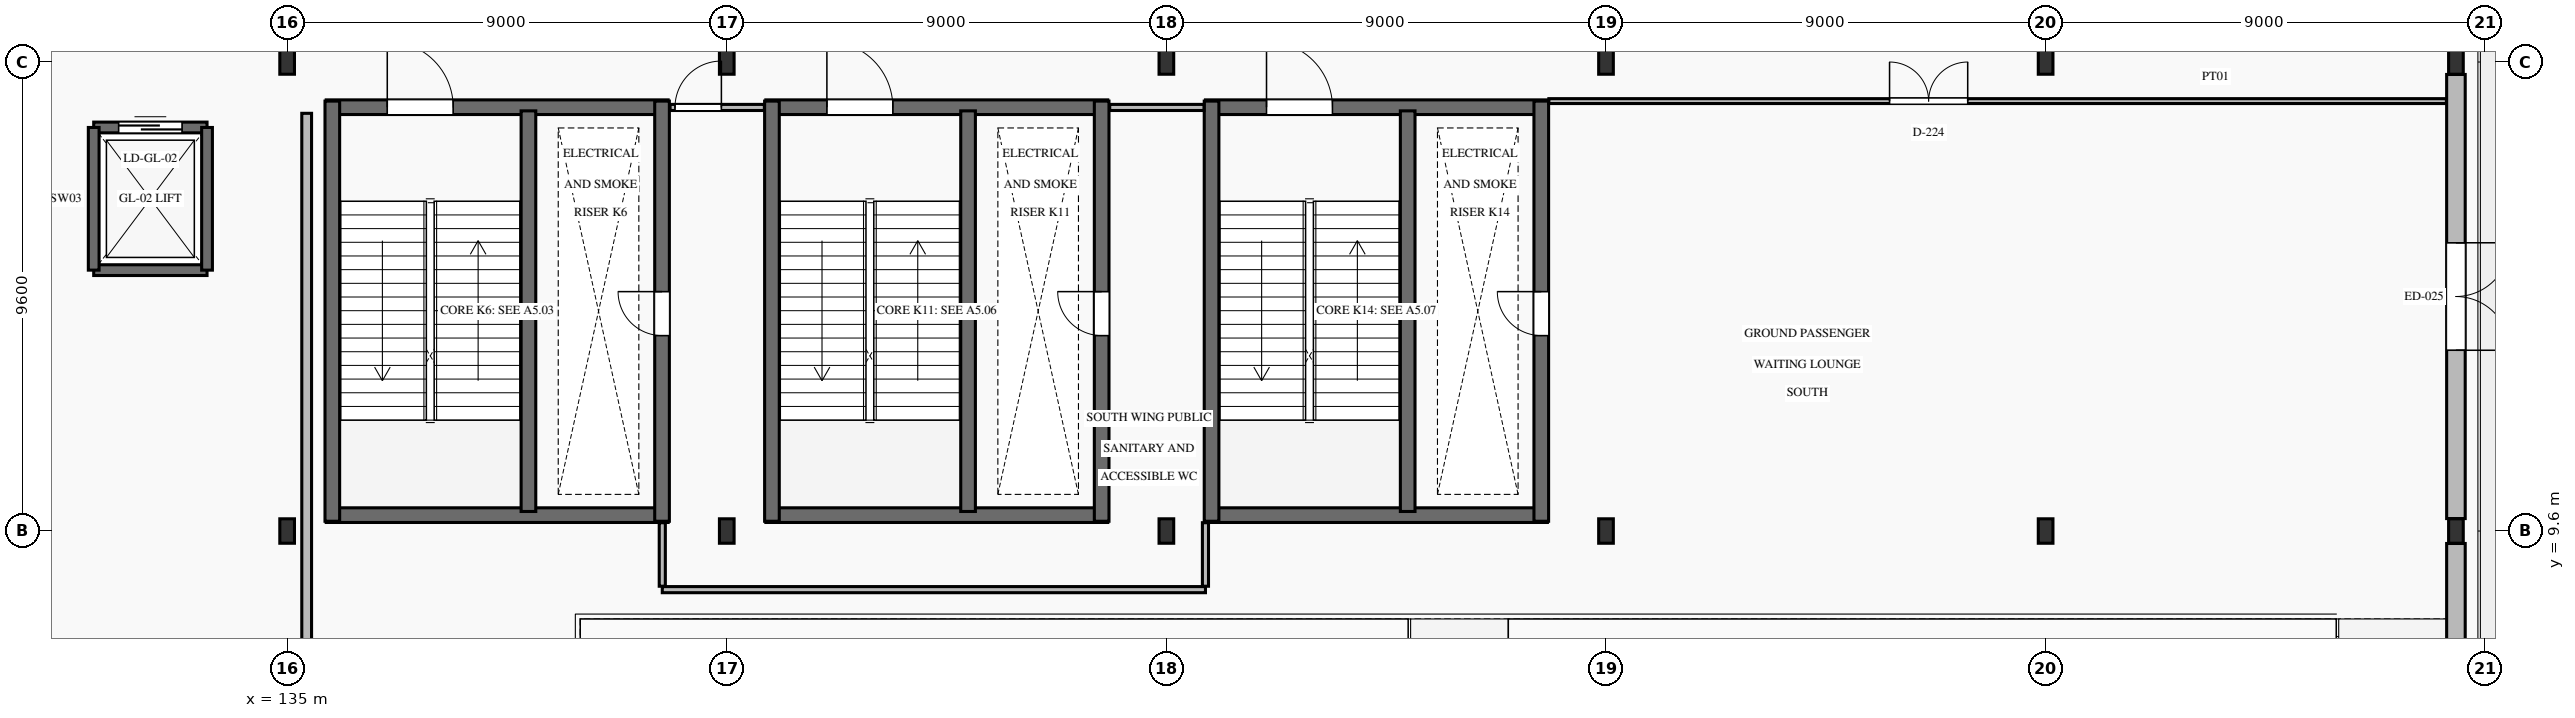
"""IFC4 building model, lengths in metres.
Left out: names, types, materials, properties, quantities, classifications, styles, units other than length and angle.
Written with IfcOpenShell. Run it as: python <this file> out.ifc"""

import sys

from ifc_helpers import new_model, si_unit, direction, frame, frame_2d, origin, origin_2d, place, context, subcontext, project, spatial, rectangle, i_section, extrude, element, fill, save


model = new_model("IFC4")
c1 = context("Model", 3, precision=1e-05, world=origin(), true_north=direction((0.0, 1.0)))
c2 = subcontext(c1, "Body", "Model", "MODEL_VIEW")
j1 = project(units=[si_unit("LENGTHUNIT", "METRE"), si_unit("PLANEANGLEUNIT", "RADIAN")], contexts=[c1])
p1 = place(None, origin())
s1 = spatial("IfcSite", under=j1, at=p1, CompositionType="ELEMENT")
p2 = place(p1, origin())
s2 = spatial("IfcBuilding", under=s1, at=p2, CompositionType="ELEMENT")
p3 = place(p2, origin())
s3 = spatial("IfcBuildingStorey", under=s2, at=p3, CompositionType="ELEMENT", Elevation=0.0)
for number, where, z_axis, x_axis in (
    (1, (135.0, 9.6, 0.0), (0.0, 0.0, 1.0), (1.0, 0.0, 0.0)),
    (2, (135.0, 19.2, 0.0), (0.0, 0.0, 1.0), (1.0, 0.0, 0.0)),
    (3, (144.0, 9.6, 0.0), (0.0, 0.0, 1.0), (1.0, 0.0, 0.0)),
    (4, (144.0, 19.2, 0.0), (0.0, 0.0, 1.0), (1.0, 0.0, 0.0)),
    (5, (153.0, 9.6, 0.0), (0.0, 0.0, 1.0), (1.0, 0.0, 0.0)),
    (6, (153.0, 19.2, 0.0), (0.0, 0.0, 1.0), (1.0, 0.0, 0.0)),
    (7, (162.0, 9.6, 0.0), (0.0, 0.0, 1.0), (1.0, 0.0, 0.0)),
    (8, (162.0, 19.2, 0.0), (0.0, 0.0, 1.0), (1.0, 0.0, 0.0)),
    (9, (171.0, 9.6, 0.0), (0.0, 0.0, 1.0), (1.0, 0.0, 0.0)),
    (10, (171.0, 19.2, 0.0), (0.0, 0.0, 1.0), (1.0, 0.0, 0.0)),
    (11, (179.4, 9.6, 0.0), (0.0, 0.0, 1.0), (1.0, 0.0, 0.0)),
    (12, (179.4, 19.2, 0.0), (0.0, 0.0, 1.0), (1.0, 0.0, 0.0)),
):
    element("IfcColumn", number, at=place(p3, frame(where, z_axis=z_axis, x_axis=x_axis)), inside=s3, PredefinedType="COLUMN", context=c2, shape_type="SweptSolid", body=[
        extrude(i_section(OverallWidth=0.3, OverallDepth=0.5, WebThickness=0.014, FlangeThickness=0.028, FilletRadius=0.027, at=origin_2d()), origin(), (0.0, 0.0, 1.0), 6.0),
    ])
p4 = place(p3, frame((179.4, 0.255, 0.0), z_axis=(0.0, 0.0, 1.0), x_axis=(0.0, 1.0, 0.0)))
e13 = element("IfcWall", 13, at=p4, inside=s3, PredefinedType="SOLIDWALL", context=c2, shape_type="SweptSolid", body=[
    extrude(rectangle(XDim=9.09, YDim=0.38, at=frame_2d((4.545, 0.0))), origin(), (0.0, 0.0, 1.0), 5.48),
])
p5 = place(p4, frame((2.245, 0.0, 0.0)))
e14 = element("IfcOpeningElement", 14, at=p5, cuts=e13, PredefinedType="OPENING", context=c2, shape_type="SweptSolid", body=[
    extrude(rectangle(XDim=4.6, YDim=3.4, at=frame_2d((2.3, 1.7))), frame((0.0, 0.205, 0.0), z_axis=(0.0, -1.0, 0.0), x_axis=(1.0, 0.0, 0.0)), (0.0, 0.0, 1.0), 0.41),
])
p6 = place(p3, frame((179.4, 9.855, 0.0), z_axis=(0.0, 0.0, 1.0), x_axis=(0.0, 1.0, 0.0)))
e15 = element("IfcWall", 15, at=p6, inside=s3, PredefinedType="SOLIDWALL", context=c2, shape_type="SweptSolid", body=[
    extrude(rectangle(XDim=9.09, YDim=0.38, at=frame_2d((4.545, 0.0))), origin(), (0.0, 0.0, 1.0), 5.48),
])
p7 = place(p6, frame((3.445, 0.0, 0.0)))
e16 = element("IfcOpeningElement", 16, at=p7, cuts=e15, PredefinedType="OPENING", context=c2, shape_type="SweptSolid", body=[
    extrude(rectangle(XDim=2.2, YDim=2.4, at=frame_2d((1.1, 1.2))), frame((0.0, 0.205, 0.0), z_axis=(0.0, -1.0, 0.0), x_axis=(1.0, 0.0, 0.0)), (0.0, 0.0, 1.0), 0.41),
])
p8 = place(p3, frame((135.8, 9.925, 0.0), z_axis=(0.0, 0.0, 1.0), x_axis=(1.0, 0.0, 0.0)))
e17 = element("IfcWall", 17, at=p8, inside=s3, PredefinedType="SHEAR", context=c2, shape_type="SweptSolid", body=[
    extrude(rectangle(XDim=7.0, YDim=0.3, at=frame_2d((3.5, 0.0))), origin(), (0.0, 0.0, 1.0), 6.0),
])
p9 = place(p3, frame((135.8, 18.275, 0.0), z_axis=(0.0, 0.0, 1.0), x_axis=(1.0, 0.0, 0.0)))
e18 = element("IfcWall", 18, at=p9, inside=s3, PredefinedType="SHEAR", context=c2, shape_type="SweptSolid", body=[
    extrude(rectangle(XDim=7.0, YDim=0.3, at=frame_2d((3.5, 0.0))), origin(), (0.0, 0.0, 1.0), 6.0),
])
p10 = place(p9, frame((1.25, 0.0, 0.0)))
e19 = element("IfcOpeningElement", 19, at=p10, cuts=e18, PredefinedType="OPENING", context=c2, shape_type="SweptSolid", body=[
    extrude(rectangle(XDim=1.35, YDim=2.2, at=frame_2d((0.675, 1.1))), frame((0.0, 0.165, 0.0), z_axis=(0.0, -1.0, 0.0), x_axis=(1.0, 0.0, 0.0)), (0.0, 0.0, 1.0), 0.33),
])
p11 = place(p3, frame((135.925, 9.8, 0.0), z_axis=(0.0, 0.0, 1.0), x_axis=(0.0, 1.0, 0.0)))
e20 = element("IfcWall", 20, at=p11, inside=s3, PredefinedType="SHEAR", context=c2, shape_type="SweptSolid", body=[
    extrude(rectangle(XDim=8.6, YDim=0.3, at=frame_2d((4.3, 0.0))), origin(), (0.0, 0.0, 1.0), 6.0),
])
p12 = place(p3, frame((142.675, 9.8, 0.0), z_axis=(0.0, 0.0, 1.0), x_axis=(0.0, 1.0, 0.0)))
e21 = element("IfcWall", 21, at=p12, inside=s3, PredefinedType="SHEAR", context=c2, shape_type="SweptSolid", body=[
    extrude(rectangle(XDim=8.6, YDim=0.3, at=frame_2d((4.3, 0.0))), origin(), (0.0, 0.0, 1.0), 6.0),
])
p13 = place(p12, frame((3.8, 0.0, 0.0)))
e22 = element("IfcOpeningElement", 22, at=p13, cuts=e21, PredefinedType="OPENING", context=c2, shape_type="SweptSolid", body=[
    extrude(rectangle(XDim=0.9, YDim=2.05, at=frame_2d((0.45, 1.025))), frame((0.0, 0.165, 0.0), z_axis=(0.0, -1.0, 0.0), x_axis=(1.0, 0.0, 0.0)), (0.0, 0.0, 1.0), 0.33),
])
p14 = place(p3, frame((139.94, 10.0, 0.0), z_axis=(0.0, 0.0, 1.0), x_axis=(0.0, 1.0, 0.0)))
e23 = element("IfcWall", 23, at=p14, inside=s3, PredefinedType="SHEAR", context=c2, shape_type="SweptSolid", body=[
    extrude(rectangle(XDim=8.2, YDim=0.3, at=frame_2d((4.1, 0.0))), origin(), (0.0, 0.0, 1.0), 6.0),
])
p15 = place(p3, frame((144.8, 9.925, 0.0), z_axis=(0.0, 0.0, 1.0), x_axis=(1.0, 0.0, 0.0)))
e24 = element("IfcWall", 24, at=p15, inside=s3, PredefinedType="SHEAR", context=c2, shape_type="SweptSolid", body=[
    extrude(rectangle(XDim=7.0, YDim=0.3, at=frame_2d((3.5, 0.0))), origin(), (0.0, 0.0, 1.0), 6.0),
])
p16 = place(p3, frame((144.8, 18.275, 0.0), z_axis=(0.0, 0.0, 1.0), x_axis=(1.0, 0.0, 0.0)))
e25 = element("IfcWall", 25, at=p16, inside=s3, PredefinedType="SHEAR", context=c2, shape_type="SweptSolid", body=[
    extrude(rectangle(XDim=7.0, YDim=0.3, at=frame_2d((3.5, 0.0))), origin(), (0.0, 0.0, 1.0), 6.0),
])
p17 = place(p16, frame((1.25, 0.0, 0.0)))
e26 = element("IfcOpeningElement", 26, at=p17, cuts=e25, PredefinedType="OPENING", context=c2, shape_type="SweptSolid", body=[
    extrude(rectangle(XDim=1.35, YDim=2.2, at=frame_2d((0.675, 1.1))), frame((0.0, 0.165, 0.0), z_axis=(0.0, -1.0, 0.0), x_axis=(1.0, 0.0, 0.0)), (0.0, 0.0, 1.0), 0.33),
])
p18 = place(p3, frame((144.925, 9.8, 0.0), z_axis=(0.0, 0.0, 1.0), x_axis=(0.0, 1.0, 0.0)))
e27 = element("IfcWall", 27, at=p18, inside=s3, PredefinedType="SHEAR", context=c2, shape_type="SweptSolid", body=[
    extrude(rectangle(XDim=8.6, YDim=0.3, at=frame_2d((4.3, 0.0))), origin(), (0.0, 0.0, 1.0), 6.0),
])
p19 = place(p3, frame((151.675, 9.8, 0.0), z_axis=(0.0, 0.0, 1.0), x_axis=(0.0, 1.0, 0.0)))
e28 = element("IfcWall", 28, at=p19, inside=s3, PredefinedType="SHEAR", context=c2, shape_type="SweptSolid", body=[
    extrude(rectangle(XDim=8.6, YDim=0.3, at=frame_2d((4.3, 0.0))), origin(), (0.0, 0.0, 1.0), 6.0),
])
p20 = place(p19, frame((3.8, 0.0, 0.0)))
e29 = element("IfcOpeningElement", 29, at=p20, cuts=e28, PredefinedType="OPENING", context=c2, shape_type="SweptSolid", body=[
    extrude(rectangle(XDim=0.9, YDim=2.05, at=frame_2d((0.45, 1.025))), frame((0.0, 0.165, 0.0), z_axis=(0.0, -1.0, 0.0), x_axis=(1.0, 0.0, 0.0)), (0.0, 0.0, 1.0), 0.33),
])
p21 = place(p3, frame((148.94, 10.0, 0.0), z_axis=(0.0, 0.0, 1.0), x_axis=(0.0, 1.0, 0.0)))
e30 = element("IfcWall", 30, at=p21, inside=s3, PredefinedType="SHEAR", context=c2, shape_type="SweptSolid", body=[
    extrude(rectangle(XDim=8.2, YDim=0.3, at=frame_2d((4.1, 0.0))), origin(), (0.0, 0.0, 1.0), 6.0),
])
p22 = place(p3, frame((153.8, 9.925, 0.0), z_axis=(0.0, 0.0, 1.0), x_axis=(1.0, 0.0, 0.0)))
e31 = element("IfcWall", 31, at=p22, inside=s3, PredefinedType="SHEAR", context=c2, shape_type="SweptSolid", body=[
    extrude(rectangle(XDim=7.0, YDim=0.3, at=frame_2d((3.5, 0.0))), origin(), (0.0, 0.0, 1.0), 6.0),
])
p23 = place(p3, frame((153.8, 18.275, 0.0), z_axis=(0.0, 0.0, 1.0), x_axis=(1.0, 0.0, 0.0)))
e32 = element("IfcWall", 32, at=p23, inside=s3, PredefinedType="SHEAR", context=c2, shape_type="SweptSolid", body=[
    extrude(rectangle(XDim=7.0, YDim=0.3, at=frame_2d((3.5, 0.0))), origin(), (0.0, 0.0, 1.0), 6.0),
])
p24 = place(p23, frame((1.25, 0.0, 0.0)))
e33 = element("IfcOpeningElement", 33, at=p24, cuts=e32, PredefinedType="OPENING", context=c2, shape_type="SweptSolid", body=[
    extrude(rectangle(XDim=1.35, YDim=2.2, at=frame_2d((0.675, 1.1))), frame((0.0, 0.165, 0.0), z_axis=(0.0, -1.0, 0.0), x_axis=(1.0, 0.0, 0.0)), (0.0, 0.0, 1.0), 0.33),
])
p25 = place(p3, frame((153.925, 9.8, 0.0), z_axis=(0.0, 0.0, 1.0), x_axis=(0.0, 1.0, 0.0)))
e34 = element("IfcWall", 34, at=p25, inside=s3, PredefinedType="SHEAR", context=c2, shape_type="SweptSolid", body=[
    extrude(rectangle(XDim=8.6, YDim=0.3, at=frame_2d((4.3, 0.0))), origin(), (0.0, 0.0, 1.0), 6.0),
])
p26 = place(p3, frame((160.675, 9.8, 0.0), z_axis=(0.0, 0.0, 1.0), x_axis=(0.0, 1.0, 0.0)))
e35 = element("IfcWall", 35, at=p26, inside=s3, PredefinedType="SHEAR", context=c2, shape_type="SweptSolid", body=[
    extrude(rectangle(XDim=8.6, YDim=0.3, at=frame_2d((4.3, 0.0))), origin(), (0.0, 0.0, 1.0), 6.0),
])
p27 = place(p26, frame((3.8, 0.0, 0.0)))
e36 = element("IfcOpeningElement", 36, at=p27, cuts=e35, PredefinedType="OPENING", context=c2, shape_type="SweptSolid", body=[
    extrude(rectangle(XDim=0.9, YDim=2.05, at=frame_2d((0.45, 1.025))), frame((0.0, 0.165, 0.0), z_axis=(0.0, -1.0, 0.0), x_axis=(1.0, 0.0, 0.0)), (0.0, 0.0, 1.0), 0.33),
])
p28 = place(p3, frame((157.94, 10.0, 0.0), z_axis=(0.0, 0.0, 1.0), x_axis=(0.0, 1.0, 0.0)))
e37 = element("IfcWall", 37, at=p28, inside=s3, PredefinedType="SHEAR", context=c2, shape_type="SweptSolid", body=[
    extrude(rectangle(XDim=8.2, YDim=0.3, at=frame_2d((4.1, 0.0))), origin(), (0.0, 0.0, 1.0), 6.0),
])
p29 = place(p3, frame((131.04, 14.94, 0.0), z_axis=(0.0, 0.0, 1.0), x_axis=(1.0, 0.0, 0.0)))
e38 = element("IfcWall", 38, at=p29, inside=s3, PredefinedType="SHEAR", context=c2, shape_type="SweptSolid", body=[
    extrude(rectangle(XDim=2.32, YDim=0.22, at=frame_2d((1.16, 0.0))), origin(), (0.0, 0.0, 1.0), 6.0),
])
p30 = place(p3, frame((131.04, 17.86, 0.0), z_axis=(0.0, 0.0, 1.0), x_axis=(1.0, 0.0, 0.0)))
e39 = element("IfcWall", 39, at=p30, inside=s3, PredefinedType="SHEAR", context=c2, shape_type="SweptSolid", body=[
    extrude(rectangle(XDim=2.32, YDim=0.22, at=frame_2d((1.16, 0.0))), origin(), (0.0, 0.0, 1.0), 6.0),
])
p31 = place(p30, frame((0.51, 0.0, 0.0)))
e40 = element("IfcOpeningElement", 40, at=p31, cuts=e39, PredefinedType="OPENING", context=c2, shape_type="SweptSolid", body=[
    extrude(rectangle(XDim=1.3, YDim=2.25, at=frame_2d((0.65, 1.125))), frame((0.0, 0.125, 0.0), z_axis=(0.0, -1.0, 0.0), x_axis=(1.0, 0.0, 0.0)), (0.0, 0.0, 1.0), 0.25),
])
for number, where, z_axis, x_axis in (
    (41, (131.04, 14.94, 0.0), (0.0, 0.0, 1.0), (0.0, 1.0, 0.0)),
    (42, (133.36, 14.94, 0.0), (0.0, 0.0, 1.0), (0.0, 1.0, 0.0)),
):
    element("IfcWall", number, at=place(p3, frame(where, z_axis=z_axis, x_axis=x_axis)), inside=s3, PredefinedType="SHEAR", context=c2, shape_type="SweptSolid", body=[
        extrude(rectangle(XDim=2.92, YDim=0.22, at=frame_2d((1.46, 0.0))), origin(), (0.0, 0.0, 1.0), 6.0),
    ])
p32 = place(p3, frame((160.83, 18.4, 0.0), z_axis=(0.0, 0.0, 1.0), x_axis=(1.0, 0.0, 0.0)))
e43 = element("IfcWall", 43, at=p32, inside=s3, PredefinedType="PARTITIONING", context=c2, shape_type="SweptSolid", body=[
    extrude(rectangle(XDim=18.375, YDim=0.1, at=frame_2d((9.188, 0.0))), origin(), (0.0, 0.0, 1.0), 5.72),
])
p33 = place(p32, frame((6.975, 0.0, 0.0)))
e44 = element("IfcOpeningElement", 44, at=p33, cuts=e43, PredefinedType="OPENING", context=c2, shape_type="SweptSolid", body=[
    extrude(rectangle(XDim=1.6, YDim=2.25, at=frame_2d((0.8, 1.125))), frame((0.0, 0.065, 0.0), z_axis=(0.0, -1.0, 0.0), x_axis=(1.0, 0.0, 0.0)), (0.0, 0.0, 1.0), 0.13),
])
p34 = place(p3, frame((135.4, 0.385, 0.0), z_axis=(0.0, 0.0, 1.0), x_axis=(0.0, 1.0, 0.0)))
e45 = element("IfcWall", 45, at=p34, inside=s3, PredefinedType="PARTITIONING", context=c2, shape_type="SweptSolid", body=[
    extrude(rectangle(XDim=17.765, YDim=0.2, at=frame_2d((8.882, 0.0))), origin(), (0.0, 0.0, 1.0), 5.72),
])
p35 = place(p3, frame((142.68, 8.4, 0.0), z_axis=(0.0, 0.0, 1.0), x_axis=(1.0, 0.0, 0.0)))
e46 = element("IfcWall", 46, at=p35, inside=s3, PredefinedType="PARTITIONING", context=c2, shape_type="SweptSolid", body=[
    extrude(rectangle(XDim=11.12, YDim=0.125, at=frame_2d((5.56, 0.0))), origin(), (0.0, 0.0, 1.0), 5.72),
])
for number, where, z_axis, x_axis in (
    (47, (142.68, 8.47, 0.0), (0.0, 0.0, 1.0), (0.0, 1.0, 0.0)),
    (48, (153.8, 8.47, 0.0), (0.0, 0.0, 1.0), (0.0, 1.0, 0.0)),
):
    element("IfcWall", number, at=place(p3, frame(where, z_axis=z_axis, x_axis=x_axis)), inside=s3, PredefinedType="PARTITIONING", context=c2, shape_type="SweptSolid", body=[
        extrude(rectangle(XDim=1.3, YDim=0.125, at=frame_2d((0.65, 0.0))), origin(), (0.0, 0.0, 1.0), 5.72),
    ])
p36 = place(p3, frame((151.84, 18.27, 0.0), z_axis=(0.0, 0.0, 1.0), x_axis=(1.0, 0.0, 0.0)))
e49 = element("IfcWall", 49, at=p36, inside=s3, PredefinedType="PARTITIONING", context=c2, shape_type="SweptSolid", body=[
    extrude(rectangle(XDim=1.93, YDim=0.125, at=frame_2d((0.965, 0.0))), origin(), (0.0, 0.0, 1.0), 5.72),
])
p37 = place(p3, frame((142.84, 18.27, 0.0), z_axis=(0.0, 0.0, 1.0), x_axis=(1.0, 0.0, 0.0)))
e50 = element("IfcWall", 50, at=p37, inside=s3, PredefinedType="PARTITIONING", context=c2, shape_type="SweptSolid", body=[
    extrude(rectangle(XDim=1.93, YDim=0.125, at=frame_2d((0.965, 0.0))), origin(), (0.0, 0.0, 1.0), 5.72),
])
p38 = place(p37, frame((0.1, 0.0, 0.0)))
e51 = element("IfcOpeningElement", 51, at=p38, cuts=e50, PredefinedType="OPENING", context=c2, shape_type="SweptSolid", body=[
    extrude(rectangle(XDim=0.95, YDim=2.1, at=frame_2d((0.475, 1.05))), frame((0.0, 0.077, 0.0), z_axis=(0.0, -1.0, 0.0), x_axis=(1.0, 0.0, 0.0)), (0.0, 0.0, 1.0), 0.155),
])
p39 = place(p7, frame((2.2, 0.0, 0.0), z_axis=(0.0, 0.0, 1.0), x_axis=(-1.0, 0.0, 0.0)))
e52 = element("IfcDoor", 52, at=p39, inside=s3, OperationType="DOUBLE_DOOR_SINGLE_SWING", PredefinedType="DOOR", context=c2, shape_type="SweptSolid", body=[
    extrude(rectangle(XDim=2.2, YDim=2.4, at=frame_2d((1.1, 1.2))), frame((0.0, 0.025, 0.0), z_axis=(0.0, -1.0, 0.0), x_axis=(1.0, 0.0, 0.0)), (0.0, 0.0, 1.0), 0.05),
])
fill(e16, e52)
p40 = place(p10, origin())
e53 = element("IfcDoor", 53, at=p40, inside=s3, OperationType="SINGLE_SWING_LEFT", PredefinedType="DOOR", context=c2, shape_type="SweptSolid", body=[
    extrude(rectangle(XDim=1.35, YDim=2.2, at=frame_2d((0.675, 1.1))), frame((0.0, 0.025, 0.0), z_axis=(0.0, -1.0, 0.0), x_axis=(1.0, 0.0, 0.0)), (0.0, 0.0, 1.0), 0.05),
])
fill(e19, e53)
p41 = place(p13, origin())
e54 = element("IfcDoor", 54, at=p41, inside=s3, OperationType="SINGLE_SWING_RIGHT", PredefinedType="DOOR", context=c2, shape_type="SweptSolid", body=[
    extrude(rectangle(XDim=0.9, YDim=2.05, at=frame_2d((0.45, 1.025))), frame((0.0, 0.025, 0.0), z_axis=(0.0, -1.0, 0.0), x_axis=(1.0, 0.0, 0.0)), (0.0, 0.0, 1.0), 0.05),
])
fill(e22, e54)
p42 = place(p17, origin())
e55 = element("IfcDoor", 55, at=p42, inside=s3, OperationType="SINGLE_SWING_LEFT", PredefinedType="DOOR", context=c2, shape_type="SweptSolid", body=[
    extrude(rectangle(XDim=1.35, YDim=2.2, at=frame_2d((0.675, 1.1))), frame((0.0, 0.025, 0.0), z_axis=(0.0, -1.0, 0.0), x_axis=(1.0, 0.0, 0.0)), (0.0, 0.0, 1.0), 0.05),
])
fill(e26, e55)
p43 = place(p20, origin())
e56 = element("IfcDoor", 56, at=p43, inside=s3, OperationType="SINGLE_SWING_RIGHT", PredefinedType="DOOR", context=c2, shape_type="SweptSolid", body=[
    extrude(rectangle(XDim=0.9, YDim=2.05, at=frame_2d((0.45, 1.025))), frame((0.0, 0.025, 0.0), z_axis=(0.0, -1.0, 0.0), x_axis=(1.0, 0.0, 0.0)), (0.0, 0.0, 1.0), 0.05),
])
fill(e29, e56)
p44 = place(p24, origin())
e57 = element("IfcDoor", 57, at=p44, inside=s3, OperationType="SINGLE_SWING_LEFT", PredefinedType="DOOR", context=c2, shape_type="SweptSolid", body=[
    extrude(rectangle(XDim=1.35, YDim=2.2, at=frame_2d((0.675, 1.1))), frame((0.0, 0.025, 0.0), z_axis=(0.0, -1.0, 0.0), x_axis=(1.0, 0.0, 0.0)), (0.0, 0.0, 1.0), 0.05),
])
fill(e33, e57)
p45 = place(p27, origin())
e58 = element("IfcDoor", 58, at=p45, inside=s3, OperationType="SINGLE_SWING_RIGHT", PredefinedType="DOOR", context=c2, shape_type="SweptSolid", body=[
    extrude(rectangle(XDim=0.9, YDim=2.05, at=frame_2d((0.45, 1.025))), frame((0.0, 0.025, 0.0), z_axis=(0.0, -1.0, 0.0), x_axis=(1.0, 0.0, 0.0)), (0.0, 0.0, 1.0), 0.05),
])
fill(e36, e58)
p46 = place(p31, origin())
e59 = element("IfcDoor", 59, at=p46, inside=s3, OperationType="SLIDING_TO_LEFT", PredefinedType="DOOR", context=c2, shape_type="SweptSolid", body=[
    extrude(rectangle(XDim=1.3, YDim=2.25, at=frame_2d((0.65, 1.125))), frame((0.0, 0.025, 0.0), z_axis=(0.0, -1.0, 0.0), x_axis=(1.0, 0.0, 0.0)), (0.0, 0.0, 1.0), 0.05),
])
fill(e40, e59)
p47 = place(p33, origin())
e60 = element("IfcDoor", 60, at=p47, inside=s3, OperationType="DOUBLE_DOOR_SINGLE_SWING", PredefinedType="DOOR", context=c2, shape_type="SweptSolid", body=[
    extrude(rectangle(XDim=1.6, YDim=2.25, at=frame_2d((0.8, 1.125))), frame((0.0, 0.025, 0.0), z_axis=(0.0, -1.0, 0.0), x_axis=(1.0, 0.0, 0.0)), (0.0, 0.0, 1.0), 0.05),
])
fill(e44, e60)
p48 = place(p38, origin())
e61 = element("IfcDoor", 61, at=p48, inside=s3, OperationType="SINGLE_SWING_RIGHT", PredefinedType="DOOR", context=c2, shape_type="SweptSolid", body=[
    extrude(rectangle(XDim=0.95, YDim=2.1, at=frame_2d((0.475, 1.05))), frame((0.0, 0.025, 0.0), z_axis=(0.0, -1.0, 0.0), x_axis=(1.0, 0.0, 0.0)), (0.0, 0.0, 1.0), 0.05),
])
fill(e51, e61)
save(model, sys.argv[1])
